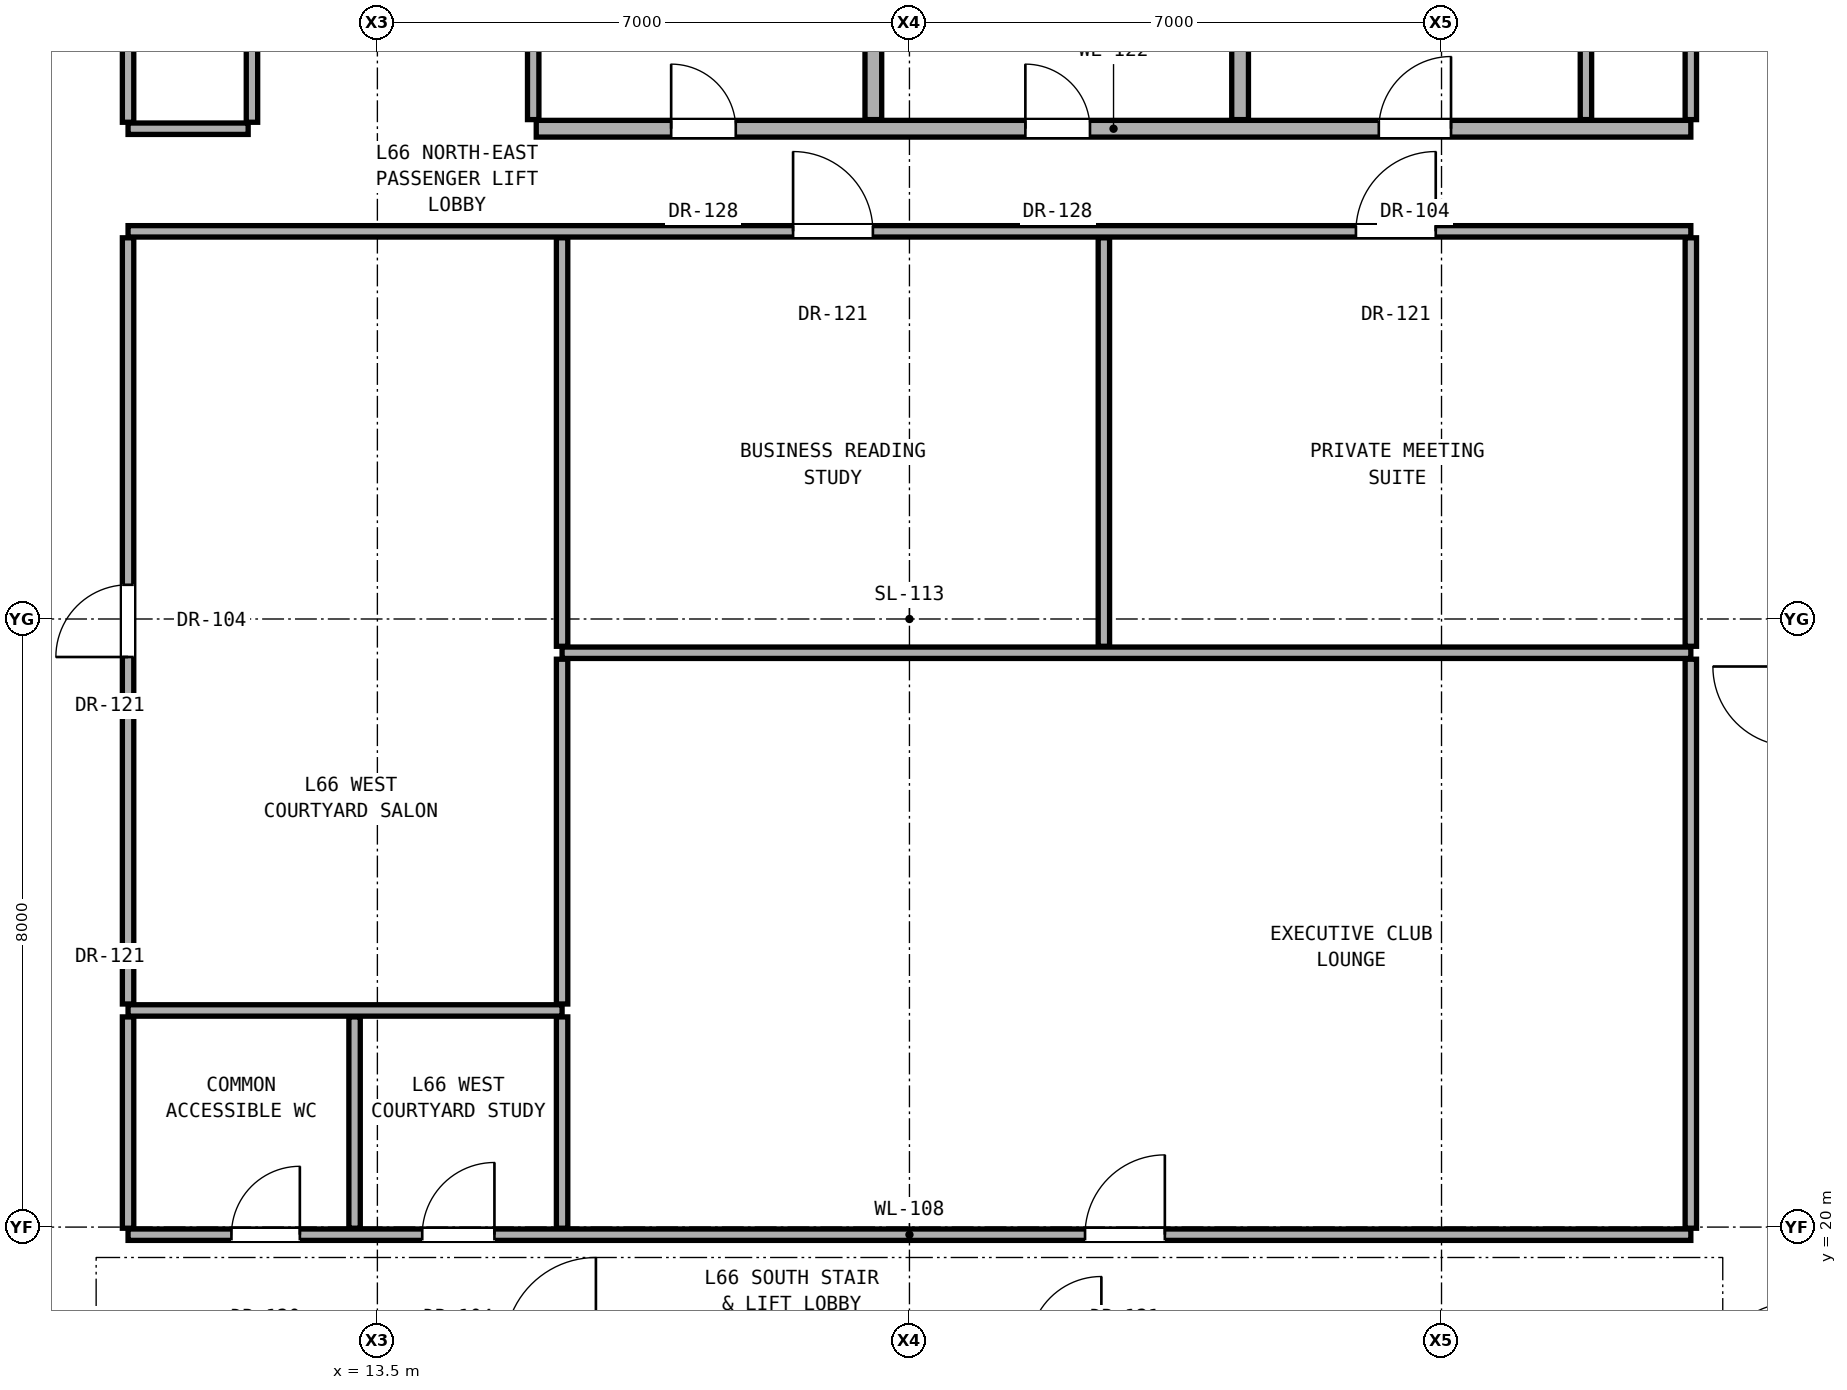
"""IFC4 building model, lengths in metres.
Left out: names, types, materials, properties, quantities, classifications, styles, units other than length and angle.
Written with IfcOpenShell. Run it as: python <this file> out.ifc"""

import sys

from ifc_helpers import new_model, si_unit, direction, frame, frame_2d, origin, place, context, subcontext, project, spatial, rectangle, extrude, element, fill, save


model = new_model("IFC4")
c1 = context("Model", 3, precision=1e-05, world=origin(), true_north=direction((0.0, 1.0)))
c2 = subcontext(c1, "Body", "Model", "MODEL_VIEW")
j1 = project(units=[si_unit("LENGTHUNIT", "METRE"), si_unit("PLANEANGLEUNIT", "RADIAN")], contexts=[c1])
p1 = place(None, origin())
s1 = spatial("IfcSite", under=j1, at=p1, CompositionType="ELEMENT")
p2 = place(p1, origin())
s2 = spatial("IfcBuilding", under=s1, at=p2, CompositionType="ELEMENT")
p3 = place(p2, frame((0.0, 0.0, 232.6)))
s3 = spatial("IfcBuildingStorey", under=s2, at=p3, CompositionType="ELEMENT", Elevation=232.6)
p4 = place(p3, frame((10.22, 19.9, 0.0), z_axis=(0.0, 0.0, 1.0), x_axis=(1.0, 0.0, 0.0)))
e1 = element("IfcWall", 1, at=p4, inside=s3, PredefinedType="PARTITIONING", context=c2, shape_type="SweptSolid", body=[
    extrude(rectangle(XDim=20.56, YDim=0.15, at=frame_2d((10.28, 0.0))), origin(), (0.0, 0.0, 1.0), 2.236),
])
p5 = place(p4, frame((1.36, 0.0, 0.0)))
e2 = element("IfcOpeningElement", 2, at=p5, cuts=e1, PredefinedType="OPENING", context=c2, shape_type="SweptSolid", body=[
    extrude(rectangle(XDim=0.9, YDim=2.1, at=frame_2d((0.45, 1.05))), frame((0.0, 0.085, 0.0), z_axis=(0.0, -1.0, 0.0), x_axis=(1.0, 0.0, 0.0)), (0.0, 0.0, 1.0), 0.17),
])
p6 = place(p4, frame((3.87, 0.0, 0.0)))
e3 = element("IfcOpeningElement", 3, at=p6, cuts=e1, PredefinedType="OPENING", context=c2, shape_type="SweptSolid", body=[
    extrude(rectangle(XDim=0.95, YDim=2.15, at=frame_2d((0.475, 1.075))), frame((0.0, 0.085, 0.0), z_axis=(0.0, -1.0, 0.0), x_axis=(1.0, 0.0, 0.0)), (0.0, 0.0, 1.0), 0.17),
])
p7 = place(p4, frame((12.59, 0.0, 0.0)))
e4 = element("IfcOpeningElement", 4, at=p7, cuts=e1, PredefinedType="OPENING", context=c2, shape_type="SweptSolid", body=[
    extrude(rectangle(XDim=1.05, YDim=2.2, at=frame_2d((0.525, 1.1))), frame((0.0, 0.085, 0.0), z_axis=(0.0, -1.0, 0.0), x_axis=(1.0, 0.0, 0.0)), (0.0, 0.0, 1.0), 0.17),
])
p8 = place(p3, frame((10.22, 22.85, 0.0), z_axis=(0.0, 0.0, 1.0), x_axis=(1.0, 0.0, 0.0)))
e5 = element("IfcWall", 5, at=p8, inside=s3, PredefinedType="PARTITIONING", context=c2, shape_type="SweptSolid", body=[
    extrude(rectangle(XDim=5.71, YDim=0.15, at=frame_2d((2.855, 0.0))), origin(), (0.0, 0.0, 1.0), 2.236),
])
p9 = place(p3, frame((15.93, 27.556, 0.0), z_axis=(0.0, 0.0, 1.0), x_axis=(1.0, 0.0, 0.0)))
e6 = element("IfcWall", 6, at=p9, inside=s3, PredefinedType="PARTITIONING", context=c2, shape_type="SweptSolid", body=[
    extrude(rectangle(XDim=14.85, YDim=0.15, at=frame_2d((7.425, 0.0))), origin(), (0.0, 0.0, 1.0), 2.236),
])
p10 = place(p3, frame((10.22, 33.1, 0.0), z_axis=(0.0, 0.0, 1.0), x_axis=(1.0, 0.0, 0.0)))
e7 = element("IfcWall", 7, at=p10, inside=s3, PredefinedType="PARTITIONING", context=c2, shape_type="SweptSolid", body=[
    extrude(rectangle(XDim=20.56, YDim=0.15, at=frame_2d((10.28, 0.0))), origin(), (0.0, 0.0, 1.0), 2.236),
])
p11 = place(p10, frame((8.749, 0.0, 0.0)))
e8 = element("IfcOpeningElement", 8, at=p11, cuts=e7, PredefinedType="OPENING", context=c2, shape_type="SweptSolid", body=[
    extrude(rectangle(XDim=1.05, YDim=2.2, at=frame_2d((0.525, 1.1))), frame((0.0, 0.085, 0.0), z_axis=(0.0, -1.0, 0.0), x_axis=(1.0, 0.0, 0.0)), (0.0, 0.0, 1.0), 0.17),
])
p12 = place(p10, frame((16.154, 0.0, 0.0)))
e9 = element("IfcOpeningElement", 9, at=p12, cuts=e7, PredefinedType="OPENING", context=c2, shape_type="SweptSolid", body=[
    extrude(rectangle(XDim=1.05, YDim=2.2, at=frame_2d((0.525, 1.1))), frame((0.0, 0.085, 0.0), z_axis=(0.0, -1.0, 0.0), x_axis=(1.0, 0.0, 0.0)), (0.0, 0.0, 1.0), 0.17),
])
p13 = place(p3, frame((10.22, 34.45, 0.0), z_axis=(0.0, 0.0, 1.0), x_axis=(1.0, 0.0, 0.0)))
e10 = element("IfcWall", 10, at=p13, inside=s3, PredefinedType="PARTITIONING", context=c2, shape_type="SweptSolid", body=[
    extrude(rectangle(XDim=1.58, YDim=0.15, at=frame_2d((0.79, 0.0))), origin(), (0.0, 0.0, 1.0), 2.236),
])
p14 = place(p3, frame((15.59, 34.45, 0.0), z_axis=(0.0, 0.0, 1.0), x_axis=(1.0, 0.0, 0.0)))
e11 = element("IfcWall", 11, at=p14, inside=s3, PredefinedType="SOLIDWALL", context=c2, shape_type="SweptSolid", body=[
    extrude(rectangle(XDim=15.19, YDim=0.22, at=frame_2d((7.595, 0.0))), origin(), (0.0, 0.0, 1.0), 2.236),
])
p15 = place(p14, frame((6.435, 0.0, 0.0)))
e12 = element("IfcOpeningElement", 12, at=p15, cuts=e11, PredefinedType="OPENING", context=c2, shape_type="SweptSolid", body=[
    extrude(rectangle(XDim=0.85, YDim=2.01, at=frame_2d((0.425, 1.005))), frame((0.0, 0.12, 0.0), z_axis=(0.0, -1.0, 0.0), x_axis=(1.0, 0.0, 0.0)), (0.0, 0.0, 1.0), 0.24),
])
p16 = place(p14, frame((11.085, 0.0, 0.0)))
e13 = element("IfcOpeningElement", 13, at=p16, cuts=e11, PredefinedType="OPENING", context=c2, shape_type="SweptSolid", body=[
    extrude(rectangle(XDim=0.95, YDim=2.15, at=frame_2d((0.475, 1.075))), frame((0.0, 0.12, 0.0), z_axis=(0.0, -1.0, 0.0), x_axis=(1.0, 0.0, 0.0)), (0.0, 0.0, 1.0), 0.24),
])
p17 = place(p14, frame((1.775, 0.0, 0.0)))
e14 = element("IfcOpeningElement", 14, at=p17, cuts=e11, PredefinedType="OPENING", context=c2, shape_type="SweptSolid", body=[
    extrude(rectangle(XDim=0.85, YDim=2.01, at=frame_2d((0.425, 1.005))), frame((0.0, 0.12, 0.0), z_axis=(0.0, -1.0, 0.0), x_axis=(1.0, 0.0, 0.0)), (0.0, 0.0, 1.0), 0.24),
])
p18 = place(p3, frame((10.22, 19.985, 0.0), z_axis=(0.0, 0.0, 1.0), x_axis=(0.0, 1.0, 0.0)))
e15 = element("IfcWall", 15, at=p18, inside=s3, PredefinedType="PARTITIONING", context=c2, shape_type="SweptSolid", body=[
    extrude(rectangle(XDim=2.78, YDim=0.15, at=frame_2d((1.39, 0.0))), origin(), (0.0, 0.0, 1.0), 3.1),
])
p19 = place(p3, frame((10.22, 22.935, 0.0), z_axis=(0.0, 0.0, 1.0), x_axis=(0.0, 1.0, 0.0)))
e16 = element("IfcWall", 16, at=p19, inside=s3, PredefinedType="PARTITIONING", context=c2, shape_type="SweptSolid", body=[
    extrude(rectangle(XDim=10.08, YDim=0.15, at=frame_2d((5.04, 0.0))), origin(), (0.0, 0.0, 1.0), 2.396),
])
p20 = place(p19, frame((4.565, 0.0, 0.0)))
e17 = element("IfcOpeningElement", 17, at=p20, cuts=e16, PredefinedType="OPENING", context=c2, shape_type="SweptSolid", body=[
    extrude(rectangle(XDim=0.95, YDim=2.15, at=frame_2d((0.475, 1.075))), frame((0.0, 0.085, 0.0), z_axis=(0.0, -1.0, 0.0), x_axis=(1.0, 0.0, 0.0)), (0.0, 0.0, 1.0), 0.17),
])
p21 = place(p3, frame((10.22, 34.535, 0.0), z_axis=(0.0, 0.0, 1.0), x_axis=(0.0, 1.0, 0.0)))
e18 = element("IfcWall", 18, at=p21, inside=s3, PredefinedType="PARTITIONING", context=c2, shape_type="SweptSolid", body=[
    extrude(rectangle(XDim=9.13, YDim=0.15, at=frame_2d((4.565, 0.0))), origin(), (0.0, 0.0, 1.0), 2.492),
])
p22 = place(p3, frame((11.85, 34.535, 0.0), z_axis=(0.0, 0.0, 1.0), x_axis=(0.0, 1.0, 0.0)))
e19 = element("IfcWall", 19, at=p22, inside=s3, PredefinedType="PARTITIONING", context=c2, shape_type="SweptSolid", body=[
    extrude(rectangle(XDim=2.845, YDim=0.15, at=frame_2d((1.422, 0.0))), origin(), (0.0, 0.0, 1.0), 3.1),
])
p23 = place(p3, frame((13.2, 19.985, 0.0), z_axis=(0.0, 0.0, 1.0), x_axis=(0.0, 1.0, 0.0)))
e20 = element("IfcWall", 20, at=p23, inside=s3, PredefinedType="PARTITIONING", context=c2, shape_type="SweptSolid", body=[
    extrude(rectangle(XDim=2.78, YDim=0.15, at=frame_2d((1.39, 0.0))), origin(), (0.0, 0.0, 1.0), 3.1),
])
p24 = place(p3, frame((15.55, 34.57, 0.0), z_axis=(0.0, 0.0, 1.0), x_axis=(0.0, 1.0, 0.0)))
e21 = element("IfcWall", 21, at=p24, inside=s3, PredefinedType="PARTITIONING", context=c2, shape_type="SweptSolid", body=[
    extrude(rectangle(XDim=2.81, YDim=0.15, at=frame_2d((1.405, 0.0))), origin(), (0.0, 0.0, 1.0), 3.1),
])
p25 = place(p3, frame((15.93, 19.985, 0.0), z_axis=(0.0, 0.0, 1.0), x_axis=(0.0, 1.0, 0.0)))
e22 = element("IfcWall", 22, at=p25, inside=s3, PredefinedType="PARTITIONING", context=c2, shape_type="SweptSolid", body=[
    extrude(rectangle(XDim=2.78, YDim=0.15, at=frame_2d((1.39, 0.0))), origin(), (0.0, 0.0, 1.0), 3.1),
])
p26 = place(p3, frame((15.93, 22.935, 0.0), z_axis=(0.0, 0.0, 1.0), x_axis=(0.0, 1.0, 0.0)))
e23 = element("IfcWall", 23, at=p26, inside=s3, PredefinedType="PARTITIONING", context=c2, shape_type="SweptSolid", body=[
    extrude(rectangle(XDim=4.536, YDim=0.15, at=frame_2d((2.268, 0.0))), origin(), (0.0, 0.0, 1.0), 2.236),
])
p27 = place(p3, frame((15.93, 27.641, 0.0), z_axis=(0.0, 0.0, 1.0), x_axis=(0.0, 1.0, 0.0)))
e24 = element("IfcWall", 24, at=p27, inside=s3, PredefinedType="PARTITIONING", context=c2, shape_type="SweptSolid", body=[
    extrude(rectangle(XDim=5.374, YDim=0.15, at=frame_2d((2.687, 0.0))), origin(), (0.0, 0.0, 1.0), 2.236),
])
p28 = place(p3, frame((20.025, 34.57, 0.0), z_axis=(0.0, 0.0, 1.0), x_axis=(0.0, 1.0, 0.0)))
e25 = element("IfcWall", 25, at=p28, inside=s3, PredefinedType="SOLIDWALL", context=c2, shape_type="SweptSolid", body=[
    extrude(rectangle(XDim=2.81, YDim=0.22, at=frame_2d((1.405, 0.0))), origin(), (0.0, 0.0, 1.0), 3.1),
])
p29 = place(p3, frame((23.058, 27.641, 0.0), z_axis=(0.0, 0.0, 1.0), x_axis=(0.0, 1.0, 0.0)))
e26 = element("IfcWall", 26, at=p29, inside=s3, PredefinedType="PARTITIONING", context=c2, shape_type="SweptSolid", body=[
    extrude(rectangle(XDim=5.374, YDim=0.15, at=frame_2d((2.687, 0.0))), origin(), (0.0, 0.0, 1.0), 2.236),
])
p30 = place(p3, frame((24.85, 34.57, 0.0), z_axis=(0.0, 0.0, 1.0), x_axis=(0.0, 1.0, 0.0)))
e27 = element("IfcWall", 27, at=p30, inside=s3, PredefinedType="SOLIDWALL", context=c2, shape_type="SweptSolid", body=[
    extrude(rectangle(XDim=2.81, YDim=0.22, at=frame_2d((1.405, 0.0))), origin(), (0.0, 0.0, 1.0), 3.1),
])
p31 = place(p3, frame((29.4, 34.57, 0.0), z_axis=(0.0, 0.0, 1.0), x_axis=(0.0, 1.0, 0.0)))
e28 = element("IfcWall", 28, at=p31, inside=s3, PredefinedType="PARTITIONING", context=c2, shape_type="SweptSolid", body=[
    extrude(rectangle(XDim=2.81, YDim=0.15, at=frame_2d((1.405, 0.0))), origin(), (0.0, 0.0, 1.0), 3.1),
])
p32 = place(p3, frame((30.78, 19.985, 0.0), z_axis=(0.0, 0.0, 1.0), x_axis=(0.0, 1.0, 0.0)))
e29 = element("IfcWall", 29, at=p32, inside=s3, PredefinedType="PARTITIONING", context=c2, shape_type="SweptSolid", body=[
    extrude(rectangle(XDim=7.486, YDim=0.15, at=frame_2d((3.743, 0.0))), origin(), (0.0, 0.0, 1.0), 2.396),
])
p33 = place(p3, frame((30.78, 27.641, 0.0), z_axis=(0.0, 0.0, 1.0), x_axis=(0.0, 1.0, 0.0)))
e30 = element("IfcWall", 30, at=p33, inside=s3, PredefinedType="PARTITIONING", context=c2, shape_type="SweptSolid", body=[
    extrude(rectangle(XDim=5.374, YDim=0.15, at=frame_2d((2.687, 0.0))), origin(), (0.0, 0.0, 1.0), 2.396),
])
p34 = place(p3, frame((30.78, 34.57, 0.0), z_axis=(0.0, 0.0, 1.0), x_axis=(0.0, 1.0, 0.0)))
e31 = element("IfcWall", 31, at=p34, inside=s3, PredefinedType="PARTITIONING", context=c2, shape_type="SweptSolid", body=[
    extrude(rectangle(XDim=9.095, YDim=0.15, at=frame_2d((4.547, 0.0))), origin(), (0.0, 0.0, 1.0), 2.492),
])
p35 = place(p15, origin())
e32 = element("IfcDoor", 32, at=p35, inside=s3, OperationType="SINGLE_SWING_LEFT", PredefinedType="DOOR", context=c2, shape_type="SweptSolid", body=[
    extrude(rectangle(XDim=0.85, YDim=2.01, at=frame_2d((0.425, 1.005))), frame((0.0, 0.025, 0.0), z_axis=(0.0, -1.0, 0.0), x_axis=(1.0, 0.0, 0.0)), (0.0, 0.0, 1.0), 0.05),
])
fill(e12, e32)
p36 = place(p16, origin())
e33 = element("IfcDoor", 33, at=p36, inside=s3, OperationType="SINGLE_SWING_RIGHT", PredefinedType="DOOR", context=c2, shape_type="SweptSolid", body=[
    extrude(rectangle(XDim=0.95, YDim=2.15, at=frame_2d((0.475, 1.075))), frame((0.0, 0.025, 0.0), z_axis=(0.0, -1.0, 0.0), x_axis=(1.0, 0.0, 0.0)), (0.0, 0.0, 1.0), 0.05),
])
fill(e13, e33)
p37 = place(p17, origin())
e34 = element("IfcDoor", 34, at=p37, inside=s3, OperationType="SINGLE_SWING_LEFT", PredefinedType="DOOR", context=c2, shape_type="SweptSolid", body=[
    extrude(rectangle(XDim=0.85, YDim=2.01, at=frame_2d((0.425, 1.005))), frame((0.0, 0.025, 0.0), z_axis=(0.0, -1.0, 0.0), x_axis=(1.0, 0.0, 0.0)), (0.0, 0.0, 1.0), 0.05),
])
fill(e14, e34)
p38 = place(p5, origin())
e35 = element("IfcDoor", 35, at=p38, inside=s3, OperationType="SINGLE_SWING_RIGHT", PredefinedType="DOOR", context=c2, shape_type="SweptSolid", body=[
    extrude(rectangle(XDim=0.9, YDim=2.1, at=frame_2d((0.45, 1.05))), frame((0.0, 0.025, 0.0), z_axis=(0.0, -1.0, 0.0), x_axis=(1.0, 0.0, 0.0)), (0.0, 0.0, 1.0), 0.05),
])
fill(e2, e35)
p39 = place(p6, origin())
e36 = element("IfcDoor", 36, at=p39, inside=s3, OperationType="SINGLE_SWING_RIGHT", PredefinedType="DOOR", context=c2, shape_type="SweptSolid", body=[
    extrude(rectangle(XDim=0.95, YDim=2.15, at=frame_2d((0.475, 1.075))), frame((0.0, 0.025, 0.0), z_axis=(0.0, -1.0, 0.0), x_axis=(1.0, 0.0, 0.0)), (0.0, 0.0, 1.0), 0.05),
])
fill(e3, e36)
p40 = place(p20, origin())
e37 = element("IfcDoor", 37, at=p40, inside=s3, OperationType="SINGLE_SWING_LEFT", PredefinedType="DOOR", context=c2, shape_type="SweptSolid", body=[
    extrude(rectangle(XDim=0.95, YDim=2.15, at=frame_2d((0.475, 1.075))), frame((0.0, 0.025, 0.0), z_axis=(0.0, -1.0, 0.0), x_axis=(1.0, 0.0, 0.0)), (0.0, 0.0, 1.0), 0.05),
])
fill(e17, e37)
p41 = place(p7, origin())
e38 = element("IfcDoor", 38, at=p41, inside=s3, OperationType="SINGLE_SWING_RIGHT", PredefinedType="DOOR", context=c2, shape_type="SweptSolid", body=[
    extrude(rectangle(XDim=1.05, YDim=2.2, at=frame_2d((0.525, 1.1))), frame((0.0, 0.025, 0.0), z_axis=(0.0, -1.0, 0.0), x_axis=(1.0, 0.0, 0.0)), (0.0, 0.0, 1.0), 0.05),
])
fill(e4, e38)
p42 = place(p11, origin())
e39 = element("IfcDoor", 39, at=p42, inside=s3, OperationType="SINGLE_SWING_LEFT", PredefinedType="DOOR", context=c2, shape_type="SweptSolid", body=[
    extrude(rectangle(XDim=1.05, YDim=2.2, at=frame_2d((0.525, 1.1))), frame((0.0, 0.025, 0.0), z_axis=(0.0, -1.0, 0.0), x_axis=(1.0, 0.0, 0.0)), (0.0, 0.0, 1.0), 0.05),
])
fill(e8, e39)
p43 = place(p12, origin())
e40 = element("IfcDoor", 40, at=p43, inside=s3, OperationType="SINGLE_SWING_RIGHT", PredefinedType="DOOR", context=c2, shape_type="SweptSolid", body=[
    extrude(rectangle(XDim=1.05, YDim=2.2, at=frame_2d((0.525, 1.1))), frame((0.0, 0.025, 0.0), z_axis=(0.0, -1.0, 0.0), x_axis=(1.0, 0.0, 0.0)), (0.0, 0.0, 1.0), 0.05),
])
fill(e9, e40)
save(model, sys.argv[1])
